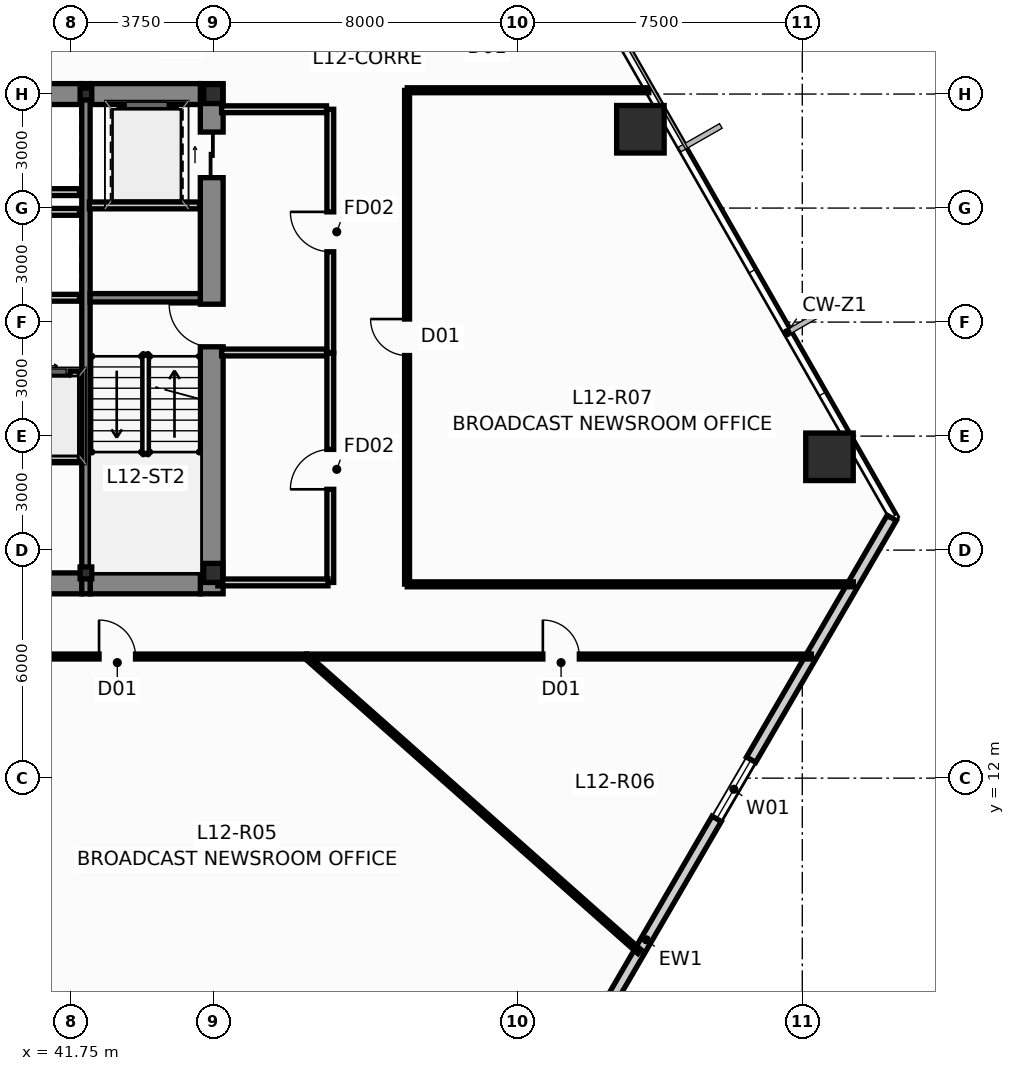
"""IFC4 building model, lengths in metres.
Left out: names, types, materials, properties, quantities, classifications, styles, units other than length and angle.
Written with IfcOpenShell. Run it as: python <this file> out.ifc"""

import sys

from ifc_helpers import new_model, si_unit, direction, frame, frame_2d, origin, origin_2d, place, context, subcontext, project, spatial, rectangle, hollow_rectangle, i_section, extrude, source, transform, mapped, element, fill, save


model = new_model("IFC4")
c1 = context("Model", 3, precision=1e-05, world=origin(), true_north=direction((0.0, 1.0)))
c2 = subcontext(c1, "Body", "Model", "MODEL_VIEW")
j1 = project(units=[si_unit("LENGTHUNIT", "METRE"), si_unit("PLANEANGLEUNIT", "RADIAN")], contexts=[c1])
p1 = place(None, origin())
s1 = spatial("IfcSite", under=j1, at=p1, CompositionType="ELEMENT")
p2 = place(p1, origin())
s2 = spatial("IfcBuilding", under=s1, at=p2, CompositionType="ELEMENT")
p3 = place(p2, frame((0.0, 0.0, 49.5)))
s3 = spatial("IfcBuildingStorey", under=s2, at=p3, CompositionType="ELEMENT", Elevation=49.5)
m1 = source(origin(), c2, "Body", "SweptSolid", [
    extrude(i_section(OverallWidth=0.5, OverallDepth=0.5, WebThickness=0.028, FlangeThickness=0.04, at=origin_2d()), origin(), (0.0, 0.0, 1.0), 3.65),
])
for number, where, z_axis, x_axis in (
    (1, (45.5, 17.4, 0.0), (0.0, 0.0, 1.0), (1.0, 0.0, 0.0)),
    (2, (45.5, 30.0, 0.0), (0.0, 0.0, 1.0), (1.0, 0.0, 0.0)),
):
    element("IfcColumn", number, at=place(p3, frame(where, z_axis=z_axis, x_axis=x_axis)), inside=s3, PredefinedType="COLUMN", context=c2, shape_type="MappedRepresentation", body=[
        mapped(m1, transform((0.0, 0.0, 0.0), scale=1.0)),
    ])
m2 = source(origin(), c2, "Body", "SweptSolid", [
    extrude(i_section(OverallWidth=0.307, OverallDepth=0.315, WebThickness=0.012, FlangeThickness=0.019, at=origin_2d()), origin(), (0.0, 0.0, 1.0), 3.65),
])
for number, where, z_axis, x_axis in (
    (3, (42.15, 17.4, 0.0), (0.0, 0.0, 1.0), (1.0, 0.0, 0.0)),
    (4, (42.15, 30.0, 0.0), (0.0, 0.0, 1.0), (1.0, 0.0, 0.0)),
):
    element("IfcColumn", number, at=place(p3, frame(where, z_axis=z_axis, x_axis=x_axis)), inside=s3, PredefinedType="COLUMN", context=c2, shape_type="MappedRepresentation", body=[
        mapped(m2, transform((0.0, 0.0, 0.0), scale=1.0)),
    ])
p4 = place(p3, frame((45.46, 16.85, 0.0), z_axis=(0.0, 0.0, 1.0), x_axis=(0.0, 1.0, 0.0)))
e5 = element("IfcWall", 5, at=p4, inside=s3, PredefinedType="SHEAR", context=c2, shape_type="SweptSolid", body=[
    extrude(rectangle(XDim=13.425, YDim=0.6, at=frame_2d((6.712, 0.0))), origin(), (0.0, 0.0, 1.0), 3.65),
])
p5 = place(p4, frame((6.5, 0.0, 0.0)))
e6 = element("IfcOpeningElement", 6, at=p5, cuts=e5, PredefinedType="OPENING", context=c2, shape_type="SweptSolid", body=[
    extrude(rectangle(XDim=1.12, YDim=2.15, at=frame_2d((0.56, 1.075))), frame((0.0, 0.312, 0.0), z_axis=(0.0, -1.0, 0.0), x_axis=(1.0, 0.0, 0.0)), (0.0, 0.0, 1.0), 0.624),
])
p6 = place(p4, frame((10.95, 0.0, 0.0)))
e7 = element("IfcOpeningElement", 7, at=p6, cuts=e5, PredefinedType="OPENING", context=c2, shape_type="SweptSolid", body=[
    extrude(rectangle(XDim=1.2, YDim=2.2, at=frame_2d((0.6, 1.1))), frame((0.0, 0.312, 0.0), z_axis=(0.0, -1.0, 0.0), x_axis=(1.0, 0.0, 0.0)), (0.0, 0.0, 1.0), 0.624),
])
p7 = place(p3, frame((33.96, 17.125, 0.0), z_axis=(0.0, 0.0, 1.0), x_axis=(1.0, 0.0, 0.0)))
e8 = element("IfcWall", 8, at=p7, inside=s3, PredefinedType="SHEAR", context=c2, shape_type="SweptSolid", body=[
    extrude(rectangle(XDim=8.08, YDim=0.55, at=frame_2d((4.04, 0.0))), origin(), (0.0, 0.0, 1.0), 3.65),
])
p8 = place(p3, frame((42.26, 17.125, 0.0), z_axis=(0.0, 0.0, 1.0), x_axis=(1.0, 0.0, 0.0)))
e9 = element("IfcWall", 9, at=p8, inside=s3, PredefinedType="SHEAR", context=c2, shape_type="SweptSolid", body=[
    extrude(rectangle(XDim=2.9, YDim=0.55, at=frame_2d((1.45, 0.0))), origin(), (0.0, 0.0, 1.0), 3.65),
])
p9 = place(p3, frame((40.16, 30.0, 0.0), z_axis=(0.0, 0.0, 1.0), x_axis=(1.0, 0.0, 0.0)))
e10 = element("IfcWall", 10, at=p9, inside=s3, PredefinedType="SHEAR", context=c2, shape_type="SweptSolid", body=[
    extrude(rectangle(XDim=1.88, YDim=0.55, at=frame_2d((0.94, 0.0))), origin(), (0.0, 0.0, 1.0), 3.65),
])
p10 = place(p3, frame((42.26, 30.0, 0.0), z_axis=(0.0, 0.0, 1.0), x_axis=(1.0, 0.0, 0.0)))
e11 = element("IfcWall", 11, at=p10, inside=s3, PredefinedType="SHEAR", context=c2, shape_type="SweptSolid", body=[
    extrude(rectangle(XDim=2.9, YDim=0.55, at=frame_2d((1.45, 0.0))), origin(), (0.0, 0.0, 1.0), 3.65),
])
p11 = place(p3, frame((42.15, 16.85, 0.0), z_axis=(0.0, 0.0, 1.0), x_axis=(0.0, 1.0, 0.0)))
e12 = element("IfcWall", 12, at=p11, inside=s3, PredefinedType="SHEAR", context=c2, shape_type="SweptSolid", body=[
    extrude(rectangle(XDim=13.425, YDim=0.22, at=frame_2d((6.712, 0.0))), origin(), (0.0, 0.0, 1.0), 3.65),
])
p12 = place(p3, frame((42.26, 24.64, 0.0), z_axis=(0.0, 0.0, 1.0), x_axis=(1.0, 0.0, 0.0)))
e13 = element("IfcWall", 13, at=p12, inside=s3, PredefinedType="SHEAR", context=c2, shape_type="SweptSolid", body=[
    extrude(rectangle(XDim=2.9, YDim=0.22, at=frame_2d((1.45, 0.0))), origin(), (0.0, 0.0, 1.0), 3.65),
])
m3 = source(origin(), c2, "Body", "SweptSolid", [
    extrude(hollow_rectangle(XDim=1.25, YDim=1.25, WallThickness=0.07, at=origin_2d()), origin(), (0.0, 0.0, 1.0), 3.651),
])
p13 = place(p3, frame((61.716, 20.456, 0.0), z_axis=(-0.010498643418, -0.021599119899, 0.999711586662), x_axis=(0.899383059768, -0.437161425336, 0.0)))
e14 = element("IfcColumn", 14, at=p13, inside=s3, PredefinedType="COLUMN", context=c2, shape_type="MappedRepresentation", body=[
    mapped(m3, transform((0.0, 0.0, 0.0), scale=1.0)),
])
m4 = source(origin(), c2, "Body", "SweptSolid", [
    extrude(hollow_rectangle(XDim=1.25, YDim=1.25, WallThickness=0.07, at=origin_2d()), origin(), (0.0, 0.0, 1.0), 3.651),
])
p14 = place(p3, frame((56.74, 29.074, 0.0), z_axis=(-0.014913313399, -0.013776424037, 0.999793880369), x_axis=(0.678553674548, -0.734550822447, 0.0)))
e15 = element("IfcColumn", 15, at=p14, inside=s3, PredefinedType="COLUMN", context=c2, shape_type="MappedRepresentation", body=[
    mapped(m4, transform((0.0, 0.0, 0.0), scale=1.0)),
])
p15 = place(p3, frame((63.354, 18.847, 0.0), z_axis=(0.0, 0.0, 1.0), x_axis=(-0.502874914108, -0.864359196608, 0.0)))
e16 = element("IfcWall", 16, at=p15, inside=s3, PredefinedType="STANDARD", context=c2, shape_type="SweptSolid", body=[
    extrude(rectangle(XDim=16.525, YDim=0.28, at=frame_2d((8.262, 0.0))), origin(), (0.0, 0.0, 1.0), 3.4),
])
p16 = place(p15, frame((7.36, 0.0, 0.9)))
e17 = element("IfcOpeningElement", 17, at=p16, cuts=e16, PredefinedType="OPENING", context=c2, shape_type="SweptSolid", body=[
    extrude(rectangle(XDim=1.8, YDim=1.8, at=frame_2d((0.9, 0.9))), frame((0.0, 0.152, 0.0), z_axis=(0.0, -1.0, 0.0), x_axis=(1.0, 0.0, 0.0)), (0.0, 0.0, 1.0), 0.304),
])
p17 = place(p3, frame((40.28, 22.62, 0.0), z_axis=(0.0, 0.0, 1.0), x_axis=(1.0, 0.0, 0.0)))
e18 = element("IfcWall", 18, at=p17, inside=s3, PredefinedType="PARTITIONING", context=c2, shape_type="SweptSolid", body=[
    extrude(rectangle(XDim=1.7, YDim=0.18, at=frame_2d((0.85, 0.0))), origin(), (0.0, 0.0, 1.0), 3.4),
])
p18 = place(p17, frame((0.35, 0.0, 0.0)))
e19 = element("IfcOpeningElement", 19, at=p18, cuts=e18, PredefinedType="OPENING", context=c2, shape_type="SweptSolid", body=[
    extrude(rectangle(XDim=1.1, YDim=2.2, at=frame_2d((0.55, 1.1))), frame((0.0, 0.102, 0.0), z_axis=(0.0, -1.0, 0.0), x_axis=(1.0, 0.0, 0.0)), (0.0, 0.0, 1.0), 0.204),
])
p19 = place(p3, frame((40.28, 26.9, 0.0), z_axis=(0.0, 0.0, 1.0), x_axis=(1.0, 0.0, 0.0)))
e20 = element("IfcWall", 20, at=p19, inside=s3, PredefinedType="PARTITIONING", context=c2, shape_type="SweptSolid", body=[
    extrude(rectangle(XDim=1.7, YDim=0.18, at=frame_2d((0.85, 0.0))), origin(), (0.0, 0.0, 1.0), 3.4),
])
p20 = place(p3, frame((40.2, 24.64, 0.0), z_axis=(0.0, 0.0, 1.0), x_axis=(1.0, 0.0, 0.0)))
e21 = element("IfcWall", 21, at=p20, inside=s3, PredefinedType="PARTITIONING", context=c2, shape_type="SweptSolid", body=[
    extrude(rectangle(XDim=1.78, YDim=0.18, at=frame_2d((0.89, 0.0))), origin(), (0.0, 0.0, 1.0), 3.4),
])
p21 = place(p3, frame((40.22, 27.42, 0.0), z_axis=(0.0, 0.0, 1.0), x_axis=(1.0, 0.0, 0.0)))
e22 = element("IfcWall", 22, at=p21, inside=s3, PredefinedType="PARTITIONING", context=c2, shape_type="SweptSolid", body=[
    extrude(rectangle(XDim=1.76, YDim=0.18, at=frame_2d((0.88, 0.0))), origin(), (0.0, 0.0, 1.0), 3.4),
])
p22 = place(p3, frame((48.58, 23.2, 0.0), z_axis=(0.0, 0.0, 1.0), x_axis=(0.0, 1.0, 0.0)))
e23 = element("IfcWall", 23, at=p22, inside=s3, PredefinedType="PARTITIONING", context=c2, shape_type="SweptSolid", body=[
    extrude(rectangle(XDim=6.4, YDim=0.18, at=frame_2d((3.2, 0.0))), origin(), (0.0, 0.0, 1.0), 3.4),
])
p23 = place(p22, frame((2.65, 0.0, 0.0)))
e24 = element("IfcOpeningElement", 24, at=p23, cuts=e23, PredefinedType="OPENING", context=c2, shape_type="SweptSolid", body=[
    extrude(rectangle(XDim=1.05, YDim=2.15, at=frame_2d((0.525, 1.075))), frame((0.0, 0.102, 0.0), z_axis=(0.0, -1.0, 0.0), x_axis=(1.0, 0.0, 0.0)), (0.0, 0.0, 1.0), 0.204),
])
p24 = place(p3, frame((45.72, 23.2, 0.0), z_axis=(0.0, 0.0, 1.0), x_axis=(1.0, 0.0, 0.0)))
e25 = element("IfcWall", 25, at=p24, inside=s3, PredefinedType="PARTITIONING", context=c2, shape_type="SweptSolid", body=[
    extrude(rectangle(XDim=2.76, YDim=0.18, at=frame_2d((1.38, 0.0))), origin(), (0.0, 0.0, 1.0), 3.4),
])
p25 = place(p3, frame((45.72, 29.6, 0.0), z_axis=(0.0, 0.0, 1.0), x_axis=(1.0, 0.0, 0.0)))
e26 = element("IfcWall", 26, at=p25, inside=s3, PredefinedType="PARTITIONING", context=c2, shape_type="SweptSolid", body=[
    extrude(rectangle(XDim=2.76, YDim=0.18, at=frame_2d((1.38, 0.0))), origin(), (0.0, 0.0, 1.0), 2.783),
])
p26 = place(p3, frame((42.24, 27.07, 0.0), z_axis=(0.0, 0.0, 1.0), x_axis=(1.0, 0.0, 0.0)))
e27 = element("IfcWall", 27, at=p26, inside=s3, PredefinedType="PARTITIONING", context=c2, shape_type="SweptSolid", body=[
    extrude(rectangle(XDim=2.9, YDim=0.18, at=frame_2d((1.45, 0.0))), origin(), (0.0, 0.0, 1.0), 3.4),
])
p27 = place(p3, frame((40.22, 20.42, 0.0), z_axis=(0.0, 0.0, 1.0), x_axis=(1.0, 0.0, 0.0)))
e28 = element("IfcWall", 28, at=p27, inside=s3, PredefinedType="PARTITIONING", context=c2, shape_type="SweptSolid", body=[
    extrude(rectangle(XDim=1.76, YDim=0.18, at=frame_2d((0.88, 0.0))), origin(), (0.0, 0.0, 1.0), 3.4),
])
p28 = place(p3, frame((48.58, 17.15, 0.0), z_axis=(0.0, 0.0, 1.0), x_axis=(0.0, 1.0, 0.0)))
e29 = element("IfcWall", 29, at=p28, inside=s3, PredefinedType="PARTITIONING", context=c2, shape_type="SweptSolid", body=[
    extrude(rectangle(XDim=6.03, YDim=0.18, at=frame_2d((3.015, 0.0))), origin(), (0.0, 0.0, 1.0), 3.026),
])
p29 = place(p28, frame((2.45, 0.0, 0.0)))
e30 = element("IfcOpeningElement", 30, at=p29, cuts=e29, PredefinedType="OPENING", context=c2, shape_type="SweptSolid", body=[
    extrude(rectangle(XDim=1.05, YDim=2.15, at=frame_2d((0.525, 1.075))), frame((0.0, 0.102, 0.0), z_axis=(0.0, -1.0, 0.0), x_axis=(1.0, 0.0, 0.0)), (0.0, 0.0, 1.0), 0.204),
])
p30 = place(p3, frame((45.62, 17.15, 0.0), z_axis=(0.0, 0.0, 1.0), x_axis=(1.0, 0.0, 0.0)))
e31 = element("IfcWall", 31, at=p30, inside=s3, PredefinedType="PARTITIONING", context=c2, shape_type="SweptSolid", body=[
    extrude(rectangle(XDim=2.9, YDim=0.18, at=frame_2d((1.45, 0.0))), origin(), (0.0, 0.0, 1.0), 2.783),
])
p31 = place(p3, frame((47.955, 15.2, 0.0), z_axis=(0.0, 0.0, 1.0), x_axis=(1.0, 0.0, 0.0)))
e32 = element("IfcWall", 32, at=p31, inside=s3, PredefinedType="PARTITIONING", context=c2, shape_type="SweptSolid", body=[
    extrude(rectangle(XDim=13.283, YDim=0.13, at=frame_2d((6.641, 0.0))), origin(), (0.0, 0.0, 1.0), 3.4),
])
p32 = place(p31, frame((6.218, 0.0, 0.0)))
e33 = element("IfcOpeningElement", 33, at=p32, cuts=e32, PredefinedType="OPENING", context=c2, shape_type="SweptSolid", body=[
    extrude(rectangle(XDim=0.96, YDim=2.15, at=frame_2d((0.48, 1.075))), frame((0.0, 0.077, 0.0), z_axis=(0.0, -1.0, 0.0), x_axis=(1.0, 0.0, 0.0)), (0.0, 0.0, 1.0), 0.154),
])
p33 = place(p3, frame((50.6, 17.105, 0.0), z_axis=(0.0, 0.0, 1.0), x_axis=(0.0, 1.0, 0.0)))
e34 = element("IfcWall", 34, at=p33, inside=s3, PredefinedType="PARTITIONING", context=c2, shape_type="SweptSolid", body=[
    extrude(rectangle(XDim=12.99, YDim=0.13, at=frame_2d((6.495, 0.0))), origin(), (0.0, 0.0, 1.0), 3.026),
])
p34 = place(p33, frame((6.015, 0.0, 0.0)))
e35 = element("IfcOpeningElement", 35, at=p34, cuts=e34, PredefinedType="OPENING", context=c2, shape_type="SweptSolid", body=[
    extrude(rectangle(XDim=0.96, YDim=2.15, at=frame_2d((0.48, 1.075))), frame((0.0, 0.077, 0.0), z_axis=(0.0, -1.0, 0.0), x_axis=(1.0, 0.0, 0.0)), (0.0, 0.0, 1.0), 0.154),
])
p35 = place(p3, frame((62.343, 17.1, 0.0), z_axis=(0.0, 0.0, 1.0), x_axis=(-1.0, 0.0, 0.0)))
e36 = element("IfcWall", 36, at=p35, inside=s3, PredefinedType="PARTITIONING", context=c2, shape_type="SweptSolid", body=[
    extrude(rectangle(XDim=11.738, YDim=0.13, at=frame_2d((5.869, 0.0))), origin(), (0.0, 0.0, 1.0), 3.4),
])
p36 = place(p3, frame((47.954, 15.197, 0.0), z_axis=(0.0, 0.0, 1.0), x_axis=(0.74854707901, -0.663081646937, 0.0)))
e37 = element("IfcWall", 37, at=p36, inside=s3, PredefinedType="PARTITIONING", context=c2, shape_type="SweptSolid", body=[
    extrude(rectangle(XDim=11.709, YDim=0.13, at=frame_2d((5.854, 0.0))), origin(), (0.0, 0.0, 1.0), 3.4),
])
p37 = place(p3, frame((38.005, 15.2, 0.0), z_axis=(0.0, 0.0, 1.0), x_axis=(1.0, 0.0, 0.0)))
e38 = element("IfcWall", 38, at=p37, inside=s3, PredefinedType="PARTITIONING", context=c2, shape_type="SweptSolid", body=[
    extrude(rectangle(XDim=9.94, YDim=0.13, at=frame_2d((4.97, 0.0))), origin(), (0.0, 0.0, 1.0), 3.026),
])
p38 = place(p37, frame((4.49, 0.0, 0.0)))
e39 = element("IfcOpeningElement", 39, at=p38, cuts=e38, PredefinedType="OPENING", context=c2, shape_type="SweptSolid", body=[
    extrude(rectangle(XDim=0.96, YDim=2.15, at=frame_2d((0.48, 1.075))), frame((0.0, 0.077, 0.0), z_axis=(0.0, -1.0, 0.0), x_axis=(1.0, 0.0, 0.0)), (0.0, 0.0, 1.0), 0.154),
])
p39 = place(p3, frame((50.605, 30.1, 0.0), z_axis=(0.0, 0.0, 1.0), x_axis=(1.0, 0.0, 0.0)))
e40 = element("IfcWall", 40, at=p39, inside=s3, PredefinedType="PARTITIONING", context=c2, shape_type="SweptSolid", body=[
    extrude(rectangle(XDim=6.356, YDim=0.13, at=frame_2d((3.178, 0.0))), origin(), (0.0, 0.0, 1.0), 3.4),
])
p40 = place(p16, origin())
e41 = element("IfcWindow", 41, at=p40, inside=s3, PartitioningType="SINGLE_PANEL", PredefinedType="WINDOW", context=c2, shape_type="SweptSolid", body=[
    extrude(rectangle(XDim=1.8, YDim=1.8, at=frame_2d((0.9, 0.9))), frame((0.0, 0.03, 0.0), z_axis=(0.0, -1.0, 0.0), x_axis=(1.0, 0.0, 0.0)), (0.0, 0.0, 1.0), 0.06),
])
fill(e17, e41)
p41 = place(p5, origin())
e42 = element("IfcDoor", 42, at=p41, inside=s3, OperationType="SINGLE_SWING_RIGHT", PredefinedType="DOOR", context=c2, shape_type="SweptSolid", body=[
    extrude(rectangle(XDim=1.12, YDim=2.15, at=frame_2d((0.56, 1.075))), frame((0.0, 0.025, 0.0), z_axis=(0.0, -1.0, 0.0), x_axis=(1.0, 0.0, 0.0)), (0.0, 0.0, 1.0), 0.05),
])
fill(e6, e42)
p42 = place(p6, origin())
e43 = element("IfcDoor", 43, at=p42, inside=s3, OperationType="SLIDING_TO_RIGHT", PredefinedType="DOOR", context=c2, shape_type="SweptSolid", body=[
    extrude(rectangle(XDim=1.2, YDim=2.2, at=frame_2d((0.6, 1.1))), frame((0.0, 0.025, 0.0), z_axis=(0.0, -1.0, 0.0), x_axis=(1.0, 0.0, 0.0)), (0.0, 0.0, 1.0), 0.05),
])
fill(e7, e43)
p43 = place(p18, origin())
e44 = element("IfcDoor", 44, at=p43, inside=s3, OperationType="SLIDING_TO_LEFT", PredefinedType="DOOR", context=c2, shape_type="SweptSolid", body=[
    extrude(rectangle(XDim=1.1, YDim=2.2, at=frame_2d((0.55, 1.1))), frame((0.0, 0.025, 0.0), z_axis=(0.0, -1.0, 0.0), x_axis=(1.0, 0.0, 0.0)), (0.0, 0.0, 1.0), 0.05),
])
fill(e19, e44)
p44 = place(p23, origin())
e45 = element("IfcDoor", 45, at=p44, inside=s3, OperationType="SINGLE_SWING_RIGHT", PredefinedType="DOOR", context=c2, shape_type="SweptSolid", body=[
    extrude(rectangle(XDim=1.05, YDim=2.15, at=frame_2d((0.525, 1.075))), frame((0.0, 0.025, 0.0), z_axis=(0.0, -1.0, 0.0), x_axis=(1.0, 0.0, 0.0)), (0.0, 0.0, 1.0), 0.05),
])
fill(e24, e45)
p45 = place(p29, origin())
e46 = element("IfcDoor", 46, at=p45, inside=s3, OperationType="SINGLE_SWING_LEFT", PredefinedType="DOOR", context=c2, shape_type="SweptSolid", body=[
    extrude(rectangle(XDim=1.05, YDim=2.15, at=frame_2d((0.525, 1.075))), frame((0.0, 0.025, 0.0), z_axis=(0.0, -1.0, 0.0), x_axis=(1.0, 0.0, 0.0)), (0.0, 0.0, 1.0), 0.05),
])
fill(e30, e46)
p46 = place(p32, origin())
e47 = element("IfcDoor", 47, at=p46, inside=s3, OperationType="SINGLE_SWING_LEFT", PredefinedType="DOOR", context=c2, shape_type="SweptSolid", body=[
    extrude(rectangle(XDim=0.96, YDim=2.15, at=frame_2d((0.48, 1.075))), frame((0.0, 0.025, 0.0), z_axis=(0.0, -1.0, 0.0), x_axis=(1.0, 0.0, 0.0)), (0.0, 0.0, 1.0), 0.05),
])
fill(e33, e47)
p47 = place(p34, origin())
e48 = element("IfcDoor", 48, at=p47, inside=s3, OperationType="SINGLE_SWING_RIGHT", PredefinedType="DOOR", context=c2, shape_type="SweptSolid", body=[
    extrude(rectangle(XDim=0.96, YDim=2.15, at=frame_2d((0.48, 1.075))), frame((0.0, 0.025, 0.0), z_axis=(0.0, -1.0, 0.0), x_axis=(1.0, 0.0, 0.0)), (0.0, 0.0, 1.0), 0.05),
])
fill(e35, e48)
p48 = place(p38, origin())
e49 = element("IfcDoor", 49, at=p48, inside=s3, OperationType="SINGLE_SWING_LEFT", PredefinedType="DOOR", context=c2, shape_type="SweptSolid", body=[
    extrude(rectangle(XDim=0.96, YDim=2.15, at=frame_2d((0.48, 1.075))), frame((0.0, 0.025, 0.0), z_axis=(0.0, -1.0, 0.0), x_axis=(1.0, 0.0, 0.0)), (0.0, 0.0, 1.0), 0.05),
])
fill(e39, e49)
save(model, sys.argv[1])
